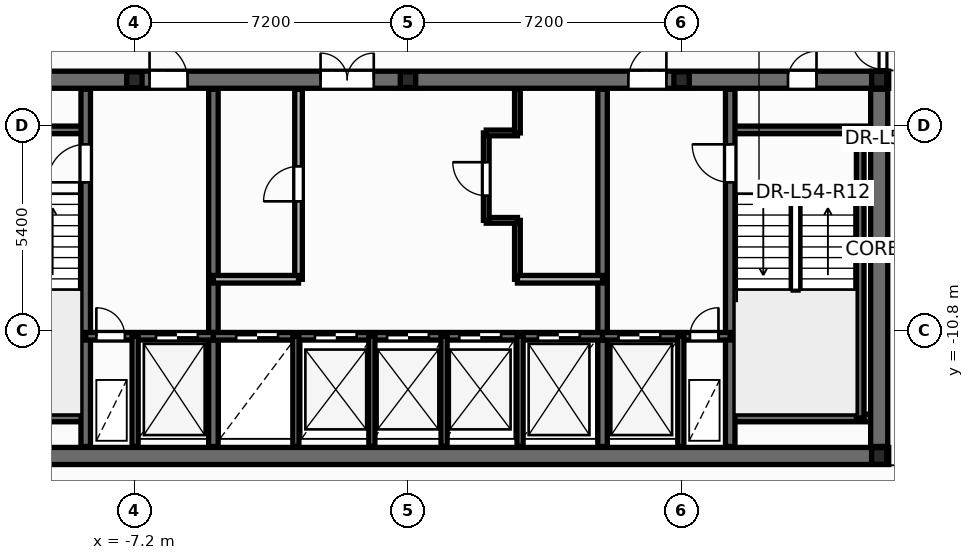
"""IFC4 building model, lengths in metres.
Left out: names, types, materials, properties, quantities, classifications, styles, units other than length and angle.
Written with IfcOpenShell. Run it as: python <this file> out.ifc"""

import sys

from ifc_helpers import new_model, si_unit, direction, frame, frame_2d, origin, origin_2d, place, context, subcontext, project, spatial, rectangle, i_section, extrude, element, fill, save


model = new_model("IFC4")
c1 = context("Model", 3, precision=1e-05, world=origin(), true_north=direction((0.0, 1.0)))
c2 = subcontext(c1, "Body", "Model", "MODEL_VIEW")
j1 = project(units=[si_unit("LENGTHUNIT", "METRE"), si_unit("PLANEANGLEUNIT", "RADIAN")], contexts=[c1])
p1 = place(None, origin())
s1 = spatial("IfcSite", under=j1, at=p1, CompositionType="ELEMENT")
p2 = place(p1, origin())
s2 = spatial("IfcBuilding", under=s1, at=p2, CompositionType="ELEMENT")
p3 = place(p2, frame((0.0, 0.0, 207.3)))
s3 = spatial("IfcBuildingStorey", under=s2, at=p3, CompositionType="ELEMENT", Elevation=207.3)
for number, where, z_axis, x_axis in (
    (1, (12.4, -14.1, 0.0), (0.0, 0.0, 1.0), (1.0, 0.0, 0.0)),
    (2, (12.4, -4.2, 0.0), (0.0, 0.0, 1.0), (1.0, 0.0, 0.0)),
):
    element("IfcColumn", number, at=place(p3, frame(where, z_axis=z_axis, x_axis=x_axis)), inside=s3, PredefinedType="COLUMN", context=c2, shape_type="SweptSolid", body=[
        extrude(i_section(OverallWidth=0.4, OverallDepth=0.44, WebThickness=0.028, FlangeThickness=0.04, at=origin_2d()), origin(), (0.0, 0.0, 1.0), 3.6),
    ])
for number, where, z_axis, x_axis in (
    (3, (-7.2, -4.2, 0.0), (0.0, 0.0, 1.0), (1.0, 0.0, 0.0)),
    (4, (0.0, -4.2, 0.0), (0.0, 0.0, 1.0), (1.0, 0.0, 0.0)),
    (5, (7.2, -4.2, 0.0), (0.0, 0.0, 1.0), (1.0, 0.0, 0.0)),
):
    element("IfcColumn", number, at=place(p3, frame(where, z_axis=z_axis, x_axis=x_axis)), inside=s3, PredefinedType="PILASTER", context=c2, shape_type="SweptSolid", body=[
        extrude(i_section(OverallWidth=0.405, OverallDepth=0.414, WebThickness=0.022, FlangeThickness=0.032, at=origin_2d()), origin(), (0.0, 0.0, 1.0), 3.6),
    ])
p4 = place(p3, frame((2.88, -9.45, 0.0), z_axis=(0.0, 0.0, 1.0), x_axis=(0.0, 1.0, 0.0)))
e6 = element("IfcWall", 6, at=p4, inside=s3, PredefinedType="PARTITIONING", context=c2, shape_type="SweptSolid", body=[
    extrude(rectangle(XDim=1.55, YDim=0.15, at=frame_2d((0.775, 0.0))), origin(), (0.0, 0.0, 1.0), 3.345),
])
p5 = place(p3, frame((2.06, -7.9, 0.0), z_axis=(0.0, 0.0, 1.0), x_axis=(1.0, 0.0, 0.0)))
e7 = element("IfcWall", 7, at=p5, inside=s3, PredefinedType="PARTITIONING", context=c2, shape_type="SweptSolid", body=[
    extrude(rectangle(XDim=0.82, YDim=0.15, at=frame_2d((0.41, 0.0))), origin(), (0.0, 0.0, 1.0), 3.345),
])
p6 = place(p3, frame((2.06, -7.9, 0.0), z_axis=(0.0, 0.0, 1.0), x_axis=(0.0, 1.0, 0.0)))
e8 = element("IfcWall", 8, at=p6, inside=s3, PredefinedType="PARTITIONING", context=c2, shape_type="SweptSolid", body=[
    extrude(rectangle(XDim=2.3, YDim=0.15, at=frame_2d((1.15, 0.0))), origin(), (0.0, 0.0, 1.0), 3.345),
])
p7 = place(p6, frame((0.65, 0.0, 0.0)))
e9 = element("IfcOpeningElement", 9, at=p7, cuts=e8, PredefinedType="OPENING", context=c2, shape_type="SweptSolid", body=[
    extrude(rectangle(XDim=0.886, YDim=2.104, at=frame_2d((0.44, 1.052))), frame((0.0, 0.085, 0.0), z_axis=(0.0, -1.0, 0.0), x_axis=(1.0, 0.0, 0.0)), (0.0, 0.0, 1.0), 0.17),
])
p8 = place(p3, frame((2.06, -5.6, 0.0), z_axis=(0.0, 0.0, 1.0), x_axis=(1.0, 0.0, 0.0)))
e10 = element("IfcWall", 10, at=p8, inside=s3, PredefinedType="PARTITIONING", context=c2, shape_type="SweptSolid", body=[
    extrude(rectangle(XDim=0.82, YDim=0.15, at=frame_2d((0.41, 0.0))), origin(), (0.0, 0.0, 1.0), 3.345),
])
p9 = place(p3, frame((2.88, -5.6, 0.0), z_axis=(0.0, 0.0, 1.0), x_axis=(0.0, 1.0, 0.0)))
e11 = element("IfcWall", 11, at=p9, inside=s3, PredefinedType="PARTITIONING", context=c2, shape_type="SweptSolid", body=[
    extrude(rectangle(XDim=1.15, YDim=0.15, at=frame_2d((0.575, 0.0))), origin(), (0.0, 0.0, 1.0), 3.345),
])
p10 = place(p3, frame((-12.65, -14.1, 0.0), z_axis=(0.0, 0.0, 1.0), x_axis=(1.0, 0.0, 0.0)))
e12 = element("IfcWall", 12, at=p10, inside=s3, PredefinedType="SHEAR", context=c2, shape_type="SweptSolid", body=[
    extrude(rectangle(XDim=25.3, YDim=0.45, at=frame_2d((12.65, 0.0))), origin(), (0.0, 0.0, 1.0), 3.6),
])
p11 = place(p3, frame((-12.65, -4.2, 0.0), z_axis=(0.0, 0.0, 1.0), x_axis=(1.0, 0.0, 0.0)))
e13 = element("IfcWall", 13, at=p11, inside=s3, PredefinedType="SHEAR", context=c2, shape_type="SweptSolid", body=[
    extrude(rectangle(XDim=25.3, YDim=0.45, at=frame_2d((12.65, 0.0))), origin(), (0.0, 0.0, 1.0), 3.6),
])
p12 = place(p11, frame((1.85, 0.0, 0.0)))
e14 = element("IfcOpeningElement", 14, at=p12, cuts=e13, PredefinedType="OPENING", context=c2, shape_type="SweptSolid", body=[
    extrude(rectangle(XDim=0.756, YDim=2.054, at=frame_2d((0.375, 1.027))), frame((0.0, 0.235, 0.0), z_axis=(0.0, -1.0, 0.0), x_axis=(1.0, 0.0, 0.0)), (0.0, 0.0, 1.0), 0.47),
])
p13 = place(p11, frame((22.65, 0.0, 0.0)))
e15 = element("IfcOpeningElement", 15, at=p13, cuts=e13, PredefinedType="OPENING", context=c2, shape_type="SweptSolid", body=[
    extrude(rectangle(XDim=0.756, YDim=2.054, at=frame_2d((0.375, 1.027))), frame((0.0, 0.235, 0.0), z_axis=(0.0, -1.0, 0.0), x_axis=(1.0, 0.0, 0.0)), (0.0, 0.0, 1.0), 0.47),
])
p14 = place(p11, frame((5.85, 0.0, 0.0)))
e16 = element("IfcOpeningElement", 16, at=p14, cuts=e13, PredefinedType="OPENING", context=c2, shape_type="SweptSolid", body=[
    extrude(rectangle(XDim=1.006, YDim=2.104, at=frame_2d((0.5, 1.052))), frame((0.0, 0.235, 0.0), z_axis=(0.0, -1.0, 0.0), x_axis=(1.0, 0.0, 0.0)), (0.0, 0.0, 1.0), 0.47),
])
p15 = place(p11, frame((10.35, 0.0, 0.0)))
e17 = element("IfcOpeningElement", 17, at=p15, cuts=e13, PredefinedType="OPENING", context=c2, shape_type="SweptSolid", body=[
    extrude(rectangle(XDim=1.406, YDim=2.154, at=frame_2d((0.7, 1.077))), frame((0.0, 0.235, 0.0), z_axis=(0.0, -1.0, 0.0), x_axis=(1.0, 0.0, 0.0)), (0.0, 0.0, 1.0), 0.47),
])
p16 = place(p11, frame((18.45, 0.0, 0.0)))
e18 = element("IfcOpeningElement", 18, at=p16, cuts=e13, PredefinedType="OPENING", context=c2, shape_type="SweptSolid", body=[
    extrude(rectangle(XDim=1.006, YDim=2.104, at=frame_2d((0.5, 1.052))), frame((0.0, 0.235, 0.0), z_axis=(0.0, -1.0, 0.0), x_axis=(1.0, 0.0, 0.0)), (0.0, 0.0, 1.0), 0.47),
])
for number, where, z_axis, x_axis in (
    (19, (-12.35, -5.52, 0.0), (0.0, 0.0, 1.0), (1.0, 0.0, 0.0)),
    (20, (-12.35, -13.1, 0.0), (0.0, 0.0, 1.0), (1.0, 0.0, 0.0)),
    (21, (8.48, -5.52, 0.0), (0.0, 0.0, 1.0), (1.0, 0.0, 0.0)),
    (22, (8.48, -13.1, 0.0), (0.0, 0.0, 1.0), (1.0, 0.0, 0.0)),
):
    element("IfcWall", number, at=place(p3, frame(where, z_axis=z_axis, x_axis=x_axis)), inside=s3, PredefinedType="SOLIDWALL", context=c2, shape_type="SweptSolid", body=[
        extrude(rectangle(XDim=3.87, YDim=0.2, at=frame_2d((1.935, 0.0))), origin(), (0.0, 0.0, 1.0), 3.6),
    ])
p17 = place(p3, frame((11.9, -13.1, 0.0), z_axis=(0.0, 0.0, 1.0), x_axis=(0.0, 1.0, 0.0)))
e23 = element("IfcWall", 23, at=p17, inside=s3, PredefinedType="SOLIDWALL", context=c2, shape_type="SweptSolid", body=[
    extrude(rectangle(XDim=7.58, YDim=0.2, at=frame_2d((3.79, 0.0))), origin(), (0.0, 0.0, 1.0), 3.6),
])
p18 = place(p3, frame((-8.48, -13.85, 0.0), z_axis=(0.0, 0.0, 1.0), x_axis=(0.0, 1.0, 0.0)))
e24 = element("IfcWall", 24, at=p18, inside=s3, PredefinedType="SHEAR", context=c2, shape_type="SweptSolid", body=[
    extrude(rectangle(XDim=9.4, YDim=0.25, at=frame_2d((4.7, 0.0))), origin(), (0.0, 0.0, 1.0), 3.6),
])
p19 = place(p18, frame((6.95, 0.0, 0.0)))
e25 = element("IfcOpeningElement", 25, at=p19, cuts=e24, PredefinedType="OPENING", context=c2, shape_type="SweptSolid", body=[
    extrude(rectangle(XDim=1.006, YDim=2.104, at=frame_2d((0.5, 1.052))), frame((0.0, 0.135, 0.0), z_axis=(0.0, -1.0, 0.0), x_axis=(1.0, 0.0, 0.0)), (0.0, 0.0, 1.0), 0.27),
])
p20 = place(p3, frame((8.48, -13.85, 0.0), z_axis=(0.0, 0.0, 1.0), x_axis=(0.0, 1.0, 0.0)))
e26 = element("IfcWall", 26, at=p20, inside=s3, PredefinedType="SHEAR", context=c2, shape_type="SweptSolid", body=[
    extrude(rectangle(XDim=9.4, YDim=0.25, at=frame_2d((4.7, 0.0))), origin(), (0.0, 0.0, 1.0), 3.6),
])
p21 = place(p20, frame((6.95, 0.0, 0.0)))
e27 = element("IfcOpeningElement", 27, at=p21, cuts=e26, PredefinedType="OPENING", context=c2, shape_type="SweptSolid", body=[
    extrude(rectangle(XDim=1.006, YDim=2.104, at=frame_2d((0.5, 1.052))), frame((0.0, 0.135, 0.0), z_axis=(0.0, -1.0, 0.0), x_axis=(1.0, 0.0, 0.0)), (0.0, 0.0, 1.0), 0.27),
])
for number, where, z_axis, x_axis in (
    (28, (-5.12, -13.85, 0.0), (0.0, 0.0, 1.0), (0.0, 1.0, 0.0)),
    (29, (5.12, -13.85, 0.0), (0.0, 0.0, 1.0), (0.0, 1.0, 0.0)),
):
    element("IfcWall", number, at=place(p3, frame(where, z_axis=z_axis, x_axis=x_axis)), inside=s3, PredefinedType="SHEAR", context=c2, shape_type="SweptSolid", body=[
        extrude(rectangle(XDim=9.4, YDim=0.25, at=frame_2d((4.7, 0.0))), origin(), (0.0, 0.0, 1.0), 3.6),
    ])
p22 = place(p3, frame((-8.48, -10.95, 0.0), z_axis=(0.0, 0.0, 1.0), x_axis=(1.0, 0.0, 0.0)))
e30 = element("IfcWall", 30, at=p22, inside=s3, PredefinedType="SOLIDWALL", context=c2, shape_type="SweptSolid", body=[
    extrude(rectangle(XDim=3.36, YDim=0.2, at=frame_2d((1.68, 0.0))), origin(), (0.0, 0.0, 1.0), 3.6),
])
p23 = place(p22, frame((0.28, 0.0, 0.0)))
e31 = element("IfcOpeningElement", 31, at=p23, cuts=e30, PredefinedType="OPENING", context=c2, shape_type="SweptSolid", body=[
    extrude(rectangle(XDim=0.756, YDim=2.054, at=frame_2d((0.375, 1.027))), frame((0.0, 0.11, 0.0), z_axis=(0.0, -1.0, 0.0), x_axis=(1.0, 0.0, 0.0)), (0.0, 0.0, 1.0), 0.22),
])
p24 = place(p22, frame((1.85, 0.0, 0.0)))
e32 = element("IfcOpeningElement", 32, at=p24, cuts=e30, PredefinedType="OPENING", context=c2, shape_type="SweptSolid", body=[
    extrude(rectangle(XDim=1.106, YDim=2.104, at=frame_2d((0.55, 1.052))), frame((0.0, 0.11, 0.0), z_axis=(0.0, -1.0, 0.0), x_axis=(1.0, 0.0, 0.0)), (0.0, 0.0, 1.0), 0.22),
])
p25 = place(p3, frame((-5.12, -10.95, 0.0), z_axis=(0.0, 0.0, 1.0), x_axis=(1.0, 0.0, 0.0)))
e33 = element("IfcWall", 33, at=p25, inside=s3, PredefinedType="SOLIDWALL", context=c2, shape_type="SweptSolid", body=[
    extrude(rectangle(XDim=10.24, YDim=0.2, at=frame_2d((5.12, 0.0))), origin(), (0.0, 0.0, 1.0), 3.6),
])
p26 = place(p25, frame((0.6, 0.0, 0.0)))
e34 = element("IfcOpeningElement", 34, at=p26, cuts=e33, PredefinedType="OPENING", context=c2, shape_type="SweptSolid", body=[
    extrude(rectangle(XDim=1.106, YDim=2.104, at=frame_2d((0.55, 1.052))), frame((0.0, 0.11, 0.0), z_axis=(0.0, -1.0, 0.0), x_axis=(1.0, 0.0, 0.0)), (0.0, 0.0, 1.0), 0.22),
])
p27 = place(p25, frame((2.67, 0.0, 0.0)))
e35 = element("IfcOpeningElement", 35, at=p27, cuts=e33, PredefinedType="OPENING", context=c2, shape_type="SweptSolid", body=[
    extrude(rectangle(XDim=1.106, YDim=2.104, at=frame_2d((0.55, 1.052))), frame((0.0, 0.11, 0.0), z_axis=(0.0, -1.0, 0.0), x_axis=(1.0, 0.0, 0.0)), (0.0, 0.0, 1.0), 0.22),
])
p28 = place(p25, frame((4.57, 0.0, 0.0)))
e36 = element("IfcOpeningElement", 36, at=p28, cuts=e33, PredefinedType="OPENING", context=c2, shape_type="SweptSolid", body=[
    extrude(rectangle(XDim=1.106, YDim=2.104, at=frame_2d((0.55, 1.052))), frame((0.0, 0.11, 0.0), z_axis=(0.0, -1.0, 0.0), x_axis=(1.0, 0.0, 0.0)), (0.0, 0.0, 1.0), 0.22),
])
p29 = place(p25, frame((6.47, 0.0, 0.0)))
e37 = element("IfcOpeningElement", 37, at=p29, cuts=e33, PredefinedType="OPENING", context=c2, shape_type="SweptSolid", body=[
    extrude(rectangle(XDim=1.106, YDim=2.104, at=frame_2d((0.55, 1.052))), frame((0.0, 0.11, 0.0), z_axis=(0.0, -1.0, 0.0), x_axis=(1.0, 0.0, 0.0)), (0.0, 0.0, 1.0), 0.22),
])
p30 = place(p25, frame((8.54, 0.0, 0.0)))
e38 = element("IfcOpeningElement", 38, at=p30, cuts=e33, PredefinedType="OPENING", context=c2, shape_type="SweptSolid", body=[
    extrude(rectangle(XDim=1.106, YDim=2.104, at=frame_2d((0.55, 1.052))), frame((0.0, 0.11, 0.0), z_axis=(0.0, -1.0, 0.0), x_axis=(1.0, 0.0, 0.0)), (0.0, 0.0, 1.0), 0.22),
])
p31 = place(p3, frame((5.12, -10.95, 0.0), z_axis=(0.0, 0.0, 1.0), x_axis=(1.0, 0.0, 0.0)))
e39 = element("IfcWall", 39, at=p31, inside=s3, PredefinedType="SOLIDWALL", context=c2, shape_type="SweptSolid", body=[
    extrude(rectangle(XDim=3.36, YDim=0.2, at=frame_2d((1.68, 0.0))), origin(), (0.0, 0.0, 1.0), 3.6),
])
p32 = place(p31, frame((0.42, 0.0, 0.0)))
e40 = element("IfcOpeningElement", 40, at=p32, cuts=e39, PredefinedType="OPENING", context=c2, shape_type="SweptSolid", body=[
    extrude(rectangle(XDim=1.106, YDim=2.104, at=frame_2d((0.55, 1.052))), frame((0.0, 0.11, 0.0), z_axis=(0.0, -1.0, 0.0), x_axis=(1.0, 0.0, 0.0)), (0.0, 0.0, 1.0), 0.22),
])
p33 = place(p31, frame((2.3, 0.0, 0.0)))
e41 = element("IfcOpeningElement", 41, at=p33, cuts=e39, PredefinedType="OPENING", context=c2, shape_type="SweptSolid", body=[
    extrude(rectangle(XDim=0.756, YDim=2.054, at=frame_2d((0.375, 1.027))), frame((0.0, 0.11, 0.0), z_axis=(0.0, -1.0, 0.0), x_axis=(1.0, 0.0, 0.0)), (0.0, 0.0, 1.0), 0.22),
])
for number, where, z_axis, x_axis in (
    (42, (-7.18, -13.85, 0.0), (0.0, 0.0, 1.0), (0.0, 1.0, 0.0)),
    (43, (7.18, -13.85, 0.0), (0.0, 0.0, 1.0), (0.0, 1.0, 0.0)),
    (44, (-2.95, -13.85, 0.0), (0.0, 0.0, 1.0), (0.0, 1.0, 0.0)),
    (45, (2.95, -13.85, 0.0), (0.0, 0.0, 1.0), (0.0, 1.0, 0.0)),
):
    element("IfcWall", number, at=place(p3, frame(where, z_axis=z_axis, x_axis=x_axis)), inside=s3, PredefinedType="PARTITIONING", context=c2, shape_type="SweptSolid", body=[
        extrude(rectangle(XDim=2.9, YDim=0.16, at=frame_2d((1.45, 0.0))), origin(), (0.0, 0.0, 1.0), 2.47),
    ])
p34 = place(p3, frame((12.4, -13.85, 0.0), z_axis=(0.0, 0.0, 1.0), x_axis=(0.0, 1.0, 0.0)))
e46 = element("IfcWall", 46, at=p34, inside=s3, PredefinedType="SHEAR", context=c2, shape_type="SweptSolid", body=[
    extrude(rectangle(XDim=9.4, YDim=0.45, at=frame_2d((4.7, 0.0))), origin(), (0.0, 0.0, 1.0), 3.6),
])
p35 = place(p3, frame((-2.88, -9.45, 0.0), z_axis=(0.0, 0.0, 1.0), x_axis=(0.0, 1.0, 0.0)))
e47 = element("IfcWall", 47, at=p35, inside=s3, PredefinedType="SOLIDWALL", context=c2, shape_type="SweptSolid", body=[
    extrude(rectangle(XDim=5.0, YDim=0.2, at=frame_2d((2.5, 0.0))), origin(), (0.0, 0.0, 1.0), 3.345),
])
p36 = place(p35, frame((2.05, 0.0, 0.0)))
e48 = element("IfcOpeningElement", 48, at=p36, cuts=e47, PredefinedType="OPENING", context=c2, shape_type="SweptSolid", body=[
    extrude(rectangle(XDim=0.926, YDim=2.104, at=frame_2d((0.46, 1.052))), frame((0.0, 0.11, 0.0), z_axis=(0.0, -1.0, 0.0), x_axis=(1.0, 0.0, 0.0)), (0.0, 0.0, 1.0), 0.22),
])
for number, where, z_axis, x_axis in (
    (49, (-5.12, -9.45, 0.0), (0.0, 0.0, 1.0), (1.0, 0.0, 0.0)),
    (50, (2.88, -9.45, 0.0), (0.0, 0.0, 1.0), (1.0, 0.0, 0.0)),
):
    element("IfcWall", number, at=place(p3, frame(where, z_axis=z_axis, x_axis=x_axis)), inside=s3, PredefinedType="SOLIDWALL", context=c2, shape_type="SweptSolid", body=[
        extrude(rectangle(XDim=2.24, YDim=0.2, at=frame_2d((1.12, 0.0))), origin(), (0.0, 0.0, 1.0), 3.345),
    ])
for number, where, z_axis, x_axis in (
    (51, (-0.95, -13.85, 0.0), (0.0, 0.0, 1.0), (0.0, 1.0, 0.0)),
    (52, (0.95, -13.85, 0.0), (0.0, 0.0, 1.0), (0.0, 1.0, 0.0)),
):
    element("IfcWall", number, at=place(p3, frame(where, z_axis=z_axis, x_axis=x_axis)), inside=s3, PredefinedType="PARTITIONING", context=c2, shape_type="SweptSolid", body=[
        extrude(rectangle(XDim=2.9, YDim=0.16, at=frame_2d((1.45, 0.0))), origin(), (0.0, 0.0, 1.0), 2.47),
    ])
p37 = place(p3, frame((12.5, -4.24, 0.0), z_axis=(0.0, 0.0, 1.0), x_axis=(0.0, 1.0, 0.0)))
e53 = element("IfcWall", 53, at=p37, inside=s3, PredefinedType="PARTITIONING", context=c2, shape_type="SweptSolid", body=[
    extrude(rectangle(XDim=1.48, YDim=0.15, at=frame_2d((0.74, 0.0))), origin(), (0.0, 0.0, 1.0), 2.32),
])
p38 = place(p37, frame((0.315, 0.0, 0.0)))
e54 = element("IfcOpeningElement", 54, at=p38, cuts=e53, PredefinedType="OPENING", context=c2, shape_type="SweptSolid", body=[
    extrude(rectangle(XDim=0.826, YDim=2.104, at=frame_2d((0.41, 1.052))), frame((0.0, 0.085, 0.0), z_axis=(0.0, -1.0, 0.0), x_axis=(1.0, 0.0, 0.0)), (0.0, 0.0, 1.0), 0.17),
])
p39 = place(p36, origin())
e55 = element("IfcDoor", 55, at=p39, inside=s3, OperationType="SINGLE_SWING_LEFT", PredefinedType="DOOR", context=c2, shape_type="SweptSolid", body=[
    extrude(rectangle(XDim=0.92, YDim=2.1, at=frame_2d((0.46, 1.05))), frame((0.0, 0.025, 0.0), z_axis=(0.0, -1.0, 0.0), x_axis=(1.0, 0.0, 0.0)), (0.0, 0.0, 1.0), 0.05),
])
fill(e48, e55)
p40 = place(p7, origin())
e56 = element("IfcDoor", 56, at=p40, inside=s3, OperationType="SINGLE_SWING_RIGHT", PredefinedType="DOOR", context=c2, shape_type="SweptSolid", body=[
    extrude(rectangle(XDim=0.88, YDim=2.1, at=frame_2d((0.44, 1.05))), frame((0.0, 0.025, 0.0), z_axis=(0.0, -1.0, 0.0), x_axis=(1.0, 0.0, 0.0)), (0.0, 0.0, 1.0), 0.05),
])
fill(e9, e56)
p41 = place(p19, origin())
e57 = element("IfcDoor", 57, at=p41, inside=s3, OperationType="SINGLE_SWING_LEFT", PredefinedType="DOOR", context=c2, shape_type="SweptSolid", body=[
    extrude(rectangle(XDim=1.0, YDim=2.1, at=frame_2d((0.5, 1.05))), frame((0.0, 0.025, 0.0), z_axis=(0.0, -1.0, 0.0), x_axis=(1.0, 0.0, 0.0)), (0.0, 0.0, 1.0), 0.05),
])
fill(e25, e57)
p42 = place(p21, origin())
e58 = element("IfcDoor", 58, at=p42, inside=s3, OperationType="SINGLE_SWING_RIGHT", PredefinedType="DOOR", context=c2, shape_type="SweptSolid", body=[
    extrude(rectangle(XDim=1.0, YDim=2.1, at=frame_2d((0.5, 1.05))), frame((0.0, 0.025, 0.0), z_axis=(0.0, -1.0, 0.0), x_axis=(1.0, 0.0, 0.0)), (0.0, 0.0, 1.0), 0.05),
])
fill(e27, e58)
p43 = place(p23, origin())
e59 = element("IfcDoor", 59, at=p43, inside=s3, OperationType="SINGLE_SWING_LEFT", PredefinedType="DOOR", context=c2, shape_type="SweptSolid", body=[
    extrude(rectangle(XDim=0.75, YDim=2.05, at=frame_2d((0.375, 1.025))), frame((0.0, 0.025, 0.0), z_axis=(0.0, -1.0, 0.0), x_axis=(1.0, 0.0, 0.0)), (0.0, 0.0, 1.0), 0.05),
])
fill(e31, e59)
p44 = place(p24, origin())
e60 = element("IfcDoor", 60, at=p44, inside=s3, OperationType="DOUBLE_DOOR_SLIDING", PredefinedType="DOOR", context=c2, shape_type="SweptSolid", body=[
    extrude(rectangle(XDim=1.1, YDim=2.1, at=frame_2d((0.55, 1.05))), frame((0.0, 0.025, 0.0), z_axis=(0.0, -1.0, 0.0), x_axis=(1.0, 0.0, 0.0)), (0.0, 0.0, 1.0), 0.05),
])
fill(e32, e60)
p45 = place(p32, origin())
e61 = element("IfcDoor", 61, at=p45, inside=s3, OperationType="DOUBLE_DOOR_SLIDING", PredefinedType="DOOR", context=c2, shape_type="SweptSolid", body=[
    extrude(rectangle(XDim=1.1, YDim=2.1, at=frame_2d((0.55, 1.05))), frame((0.0, 0.025, 0.0), z_axis=(0.0, -1.0, 0.0), x_axis=(1.0, 0.0, 0.0)), (0.0, 0.0, 1.0), 0.05),
])
fill(e40, e61)
p46 = place(p33, origin())
e62 = element("IfcDoor", 62, at=p46, inside=s3, OperationType="SINGLE_SWING_RIGHT", PredefinedType="DOOR", context=c2, shape_type="SweptSolid", body=[
    extrude(rectangle(XDim=0.75, YDim=2.05, at=frame_2d((0.375, 1.025))), frame((0.0, 0.025, 0.0), z_axis=(0.0, -1.0, 0.0), x_axis=(1.0, 0.0, 0.0)), (0.0, 0.0, 1.0), 0.05),
])
fill(e41, e62)
p47 = place(p26, origin())
e63 = element("IfcDoor", 63, at=p47, inside=s3, OperationType="DOUBLE_DOOR_SLIDING", PredefinedType="DOOR", context=c2, shape_type="SweptSolid", body=[
    extrude(rectangle(XDim=1.1, YDim=2.1, at=frame_2d((0.55, 1.05))), frame((0.0, 0.025, 0.0), z_axis=(0.0, -1.0, 0.0), x_axis=(1.0, 0.0, 0.0)), (0.0, 0.0, 1.0), 0.05),
])
fill(e34, e63)
p48 = place(p27, origin())
e64 = element("IfcDoor", 64, at=p48, inside=s3, OperationType="DOUBLE_DOOR_SLIDING", PredefinedType="DOOR", context=c2, shape_type="SweptSolid", body=[
    extrude(rectangle(XDim=1.1, YDim=2.1, at=frame_2d((0.55, 1.05))), frame((0.0, 0.025, 0.0), z_axis=(0.0, -1.0, 0.0), x_axis=(1.0, 0.0, 0.0)), (0.0, 0.0, 1.0), 0.05),
])
fill(e35, e64)
p49 = place(p28, origin())
e65 = element("IfcDoor", 65, at=p49, inside=s3, OperationType="DOUBLE_DOOR_SLIDING", PredefinedType="DOOR", context=c2, shape_type="SweptSolid", body=[
    extrude(rectangle(XDim=1.1, YDim=2.1, at=frame_2d((0.55, 1.05))), frame((0.0, 0.025, 0.0), z_axis=(0.0, -1.0, 0.0), x_axis=(1.0, 0.0, 0.0)), (0.0, 0.0, 1.0), 0.05),
])
fill(e36, e65)
p50 = place(p29, origin())
e66 = element("IfcDoor", 66, at=p50, inside=s3, OperationType="DOUBLE_DOOR_SLIDING", PredefinedType="DOOR", context=c2, shape_type="SweptSolid", body=[
    extrude(rectangle(XDim=1.1, YDim=2.1, at=frame_2d((0.55, 1.05))), frame((0.0, 0.025, 0.0), z_axis=(0.0, -1.0, 0.0), x_axis=(1.0, 0.0, 0.0)), (0.0, 0.0, 1.0), 0.05),
])
fill(e37, e66)
p51 = place(p30, origin())
e67 = element("IfcDoor", 67, at=p51, inside=s3, OperationType="DOUBLE_DOOR_SLIDING", PredefinedType="DOOR", context=c2, shape_type="SweptSolid", body=[
    extrude(rectangle(XDim=1.1, YDim=2.1, at=frame_2d((0.55, 1.05))), frame((0.0, 0.025, 0.0), z_axis=(0.0, -1.0, 0.0), x_axis=(1.0, 0.0, 0.0)), (0.0, 0.0, 1.0), 0.05),
])
fill(e38, e67)
p52 = place(p13, origin())
e68 = element("IfcDoor", 68, at=p52, inside=s3, OperationType="SINGLE_SWING_RIGHT", PredefinedType="DOOR", context=c2, shape_type="SweptSolid", body=[
    extrude(rectangle(XDim=0.75, YDim=2.05, at=frame_2d((0.375, 1.025))), frame((0.0, 0.025, 0.0), z_axis=(0.0, -1.0, 0.0), x_axis=(1.0, 0.0, 0.0)), (0.0, 0.0, 1.0), 0.05),
])
fill(e15, e68)
p53 = place(p14, origin())
e69 = element("IfcDoor", 69, at=p53, inside=s3, OperationType="SINGLE_SWING_LEFT", PredefinedType="DOOR", context=c2, shape_type="SweptSolid", body=[
    extrude(rectangle(XDim=1.0, YDim=2.1, at=frame_2d((0.5, 1.05))), frame((0.0, 0.025, 0.0), z_axis=(0.0, -1.0, 0.0), x_axis=(1.0, 0.0, 0.0)), (0.0, 0.0, 1.0), 0.05),
])
fill(e16, e69)
p54 = place(p15, origin())
e70 = element("IfcDoor", 70, at=p54, inside=s3, OperationType="DOUBLE_DOOR_SINGLE_SWING", PredefinedType="DOOR", context=c2, shape_type="SweptSolid", body=[
    extrude(rectangle(XDim=1.4, YDim=2.15, at=frame_2d((0.7, 1.075))), frame((0.0, 0.025, 0.0), z_axis=(0.0, -1.0, 0.0), x_axis=(1.0, 0.0, 0.0)), (0.0, 0.0, 1.0), 0.05),
])
fill(e17, e70)
p55 = place(p16, origin())
e71 = element("IfcDoor", 71, at=p55, inside=s3, OperationType="SINGLE_SWING_RIGHT", PredefinedType="DOOR", context=c2, shape_type="SweptSolid", body=[
    extrude(rectangle(XDim=1.0, YDim=2.1, at=frame_2d((0.5, 1.05))), frame((0.0, 0.025, 0.0), z_axis=(0.0, -1.0, 0.0), x_axis=(1.0, 0.0, 0.0)), (0.0, 0.0, 1.0), 0.05),
])
fill(e18, e71)
p56 = place(p38, origin())
e72 = element("IfcDoor", 72, at=p56, inside=s3, OperationType="SINGLE_SWING_RIGHT", PredefinedType="DOOR", context=c2, shape_type="SweptSolid", body=[
    extrude(rectangle(XDim=0.82, YDim=2.1, at=frame_2d((0.41, 1.05))), frame((0.0, 0.025, 0.0), z_axis=(0.0, -1.0, 0.0), x_axis=(1.0, 0.0, 0.0)), (0.0, 0.0, 1.0), 0.05),
])
fill(e54, e72)
save(model, sys.argv[1])
